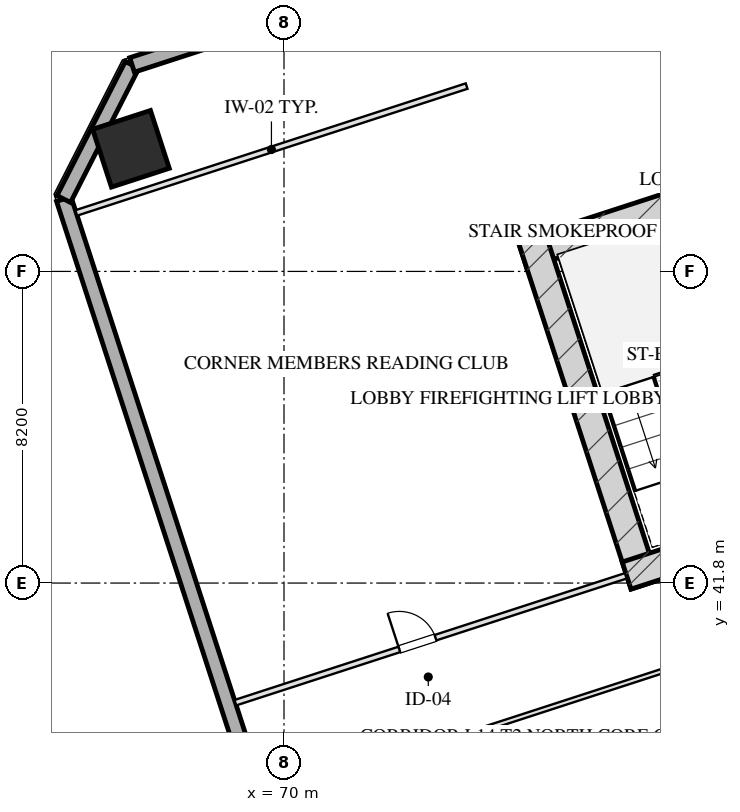
"""IFC4 building model, lengths in metres.
Left out: names, types, materials, properties, quantities, classifications, styles, units other than length and angle.
Written with IfcOpenShell. Run it as: python <this file> out.ifc"""

import sys

from ifc_helpers import new_model, si_unit, direction, frame, frame_2d, origin, origin_2d, place, context, subcontext, project, spatial, rectangle, hollow_rectangle, extrude, element, fill, save


model = new_model("IFC4")
c1 = context("Model", 3, precision=1e-05, world=origin(), true_north=direction((0.0, 1.0)))
c2 = subcontext(c1, "Body", "Model", "MODEL_VIEW")
j1 = project(units=[si_unit("LENGTHUNIT", "METRE"), si_unit("PLANEANGLEUNIT", "RADIAN")], contexts=[c1])
p1 = place(None, origin())
s1 = spatial("IfcSite", under=j1, at=p1, CompositionType="ELEMENT")
p2 = place(p1, origin())
s2 = spatial("IfcBuilding", under=s1, at=p2, CompositionType="ELEMENT")
p3 = place(p2, frame((0.0, 0.0, 60.95)))
s3 = spatial("IfcBuildingStorey", under=s2, at=p3, CompositionType="ELEMENT", Elevation=60.95)
p4 = place(p3, frame((76.272, 50.443, 0.0), z_axis=(0.0, 0.0, 1.0), x_axis=(0.951056072937, 0.309018358888, 0.0)))
e1 = element("IfcWall", 1, at=p4, inside=s3, PredefinedType="SHEAR", context=c2, shape_type="SweptSolid", body=[
    extrude(rectangle(XDim=16.55, YDim=0.75, at=frame_2d((8.275, 0.0))), origin(), (0.0, 0.0, 1.0), 3.45),
])
p5 = place(p3, frame((79.489, 41.756, 0.0), z_axis=(0.0, 0.0, 1.0), x_axis=(-0.309016134813, 0.951056795583, 0.0)))
e2 = element("IfcWall", 2, at=p5, inside=s3, PredefinedType="SHEAR", context=c2, shape_type="SweptSolid", body=[
    extrude(rectangle(XDim=9.63, YDim=0.75, at=frame_2d((4.815, 0.0))), origin(), (0.0, 0.0, 1.0), 3.45),
])
p6 = place(p3, frame((79.016, 41.997, 0.0), z_axis=(0.0, 0.0, 1.0), x_axis=(0.95106038264, 0.309005094736, 0.0)))
e3 = element("IfcWall", 3, at=p6, inside=s3, PredefinedType="SHEAR", context=c2, shape_type="SweptSolid", body=[
    extrude(rectangle(XDim=4.295, YDim=0.75, at=frame_2d((2.147, 0.0))), origin(), (0.0, 0.0, 1.0), 3.45),
])
p7 = place(p3, frame((65.973, 53.226, 0.0), z_axis=(0.0, 0.0, 1.0), x_axis=(0.951056516295, 0.309016994375, 0.0)))
e4 = element("IfcColumn", 4, at=p7, inside=s3, PredefinedType="COLUMN", context=c2, shape_type="SweptSolid", body=[
    extrude(hollow_rectangle(XDim=1.6, YDim=1.6, WallThickness=0.055, at=origin_2d()), origin(), (0.0, 0.0, 1.0), 3.451),
])
p8 = place(p3, frame((79.655, 4.352, 0.0), z_axis=(0.0, 0.0, 1.0), x_axis=(-0.309014526607, 0.951057318118, 0.0)))
e5 = element("IfcWall", 5, at=p8, inside=s3, PredefinedType="SOLIDWALL", context=c2, shape_type="SweptSolid", body=[
    extrude(rectangle(XDim=50.0, YDim=0.4, at=frame_2d((25.0, 0.0))), origin(), (0.0, 0.0, 1.0), 2.61),
])
p9 = place(p8, frame((30.15, 0.0, 0.75)))
e6 = element("IfcOpeningElement", 6, at=p9, cuts=e5, PredefinedType="OPENING", context=c2, shape_type="SweptSolid", body=[
    extrude(rectangle(XDim=2.5, YDim=1.46, at=frame_2d((1.25, 0.73))), frame((0.0, 0.21, 0.0), z_axis=(0.0, -1.0, 0.0), x_axis=(1.0, 0.0, 0.0)), (0.0, 0.0, 1.0), 0.42),
])
p10 = place(p8, frame((18.65, 0.0, 0.0)))
e7 = element("IfcOpeningElement", 7, at=p10, cuts=e5, PredefinedType="OPENING", context=c2, shape_type="SweptSolid", body=[
    extrude(rectangle(XDim=1.1, YDim=2.15, at=frame_2d((0.55, 1.075))), frame((0.0, 0.21, 0.0), z_axis=(0.0, -1.0, 0.0), x_axis=(1.0, 0.0, 0.0)), (0.0, 0.0, 1.0), 0.42),
])
p11 = place(p3, frame((64.205, 51.905, 0.0), z_axis=(0.0, 0.0, 1.0), x_axis=(0.453958106755, 0.891023028497, 0.0)))
e8 = element("IfcWall", 8, at=p11, inside=s3, PredefinedType="SOLIDWALL", context=c2, shape_type="SweptSolid", body=[
    extrude(rectangle(XDim=3.96, YDim=0.4, at=frame_2d((1.98, 0.0))), origin(), (0.0, 0.0, 1.0), 2.61),
])
p12 = place(p3, frame((66.002, 55.433, 0.0), z_axis=(0.0, 0.0, 1.0), x_axis=(0.951055939317, 0.309018770125, 0.0)))
e9 = element("IfcWall", 9, at=p12, inside=s3, PredefinedType="SOLIDWALL", context=c2, shape_type="SweptSolid", body=[
    extrude(rectangle(XDim=32.4, YDim=0.4, at=frame_2d((16.2, 0.0))), origin(), (0.0, 0.0, 1.0), 2.61),
])
p13 = place(p3, frame((64.534, 51.539, 0.0), z_axis=(0.0, 0.0, 1.0), x_axis=(0.951056658866, 0.309016555588, 0.0)))
e10 = element("IfcWall", 10, at=p13, inside=s3, PredefinedType="PARTITIONING", context=c2, shape_type="SweptSolid", body=[
    extrude(rectangle(XDim=10.8, YDim=0.15, at=frame_2d((5.4, 0.0))), origin(), (0.0, 0.0, 1.0), 3.175),
])
p14 = place(p3, frame((68.721, 38.652, 0.0), z_axis=(0.0, 0.0, 1.0), x_axis=(0.951056658866, 0.309016555588, 0.0)))
e11 = element("IfcWall", 11, at=p14, inside=s3, PredefinedType="PARTITIONING", context=c2, shape_type="SweptSolid", body=[
    extrude(rectangle(XDim=10.8, YDim=0.15, at=frame_2d((5.4, 0.0))), origin(), (0.0, 0.0, 1.0), 3.175),
])
p15 = place(p14, frame((4.536, 0.0, 0.0)))
e12 = element("IfcOpeningElement", 12, at=p15, cuts=e11, PredefinedType="OPENING", context=c2, shape_type="SweptSolid", body=[
    extrude(rectangle(XDim=1.0, YDim=2.05, at=frame_2d((0.5, 1.025))), frame((0.0, 0.085, 0.0), z_axis=(0.0, -1.0, 0.0), x_axis=(1.0, 0.0, 0.0)), (0.0, 0.0, 1.0), 0.17),
])
p16 = place(p3, frame((69.549, 36.103, 0.0), z_axis=(0.0, 0.0, 1.0), x_axis=(0.951054756643, 0.309022409974, 0.0)))
e13 = element("IfcWall", 13, at=p16, inside=s3, PredefinedType="PARTITIONING", context=c2, shape_type="SweptSolid", body=[
    extrude(rectangle(XDim=15.175, YDim=0.12, at=frame_2d((7.587, 0.0))), origin(), (0.0, 0.0, 1.0), 3.175),
])
p17 = place(p15, origin())
e14 = element("IfcDoor", 14, at=p17, inside=s3, OperationType="SINGLE_SWING_LEFT", PredefinedType="DOOR", context=c2, shape_type="SweptSolid", body=[
    extrude(rectangle(XDim=1.0, YDim=2.05, at=frame_2d((0.5, 1.025))), frame((0.0, 0.025, 0.0), z_axis=(0.0, -1.0, 0.0), x_axis=(1.0, 0.0, 0.0)), (0.0, 0.0, 1.0), 0.05),
])
fill(e12, e14)
save(model, sys.argv[1])
